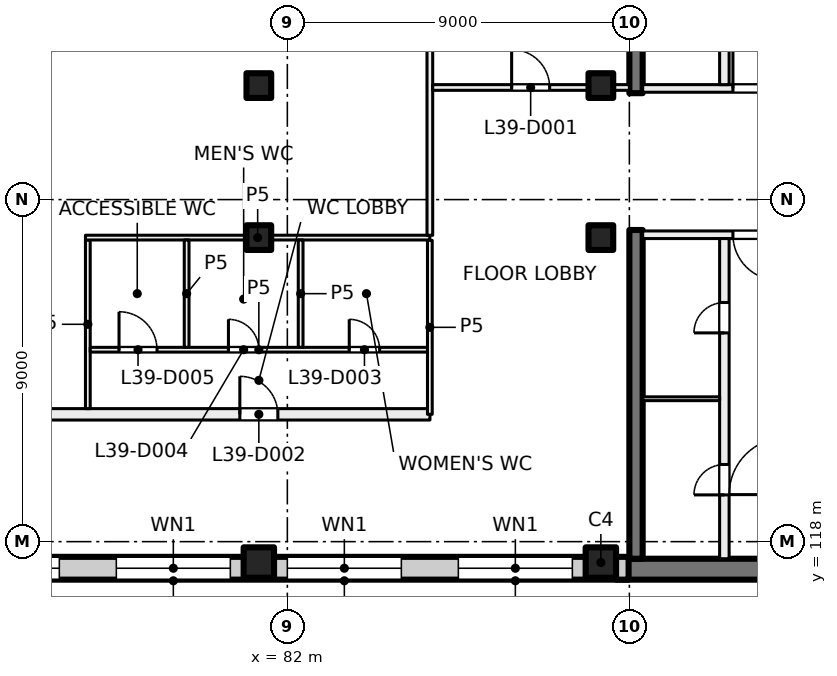
"""IFC4 building model, lengths in metres.
Left out: names, types, materials, properties, quantities, classifications, styles, units other than length and angle.
Written with IfcOpenShell. Run it as: python <this file> out.ifc"""

import sys

from ifc_helpers import new_model, si_unit, direction, frame, frame_2d, origin, origin_2d, place, context, subcontext, project, spatial, rectangle, extrude, element, fill, save


model = new_model("IFC4")
c1 = context("Model", 3, precision=1e-05, world=origin(), true_north=direction((0.0, 1.0)))
c2 = subcontext(c1, "Body", "Model", "MODEL_VIEW")
j1 = project(units=[si_unit("LENGTHUNIT", "METRE"), si_unit("PLANEANGLEUNIT", "RADIAN")], contexts=[c1])
p1 = place(None, origin())
s1 = spatial("IfcSite", under=j1, at=p1, CompositionType="ELEMENT")
p2 = place(p1, origin())
s2 = spatial("IfcBuilding", under=s1, at=p2, CompositionType="ELEMENT")
p3 = place(p2, frame((0.0, 0.0, 166.5)))
s3 = spatial("IfcBuildingStorey", under=s2, at=p3, CompositionType="ELEMENT", Elevation=166.5)
for number, where, z_axis, x_axis in (
    (1, (81.25, 130.0, 0.0), (0.0, 0.0, 1.0), (1.0, 0.0, 0.0)),
    (2, (90.25, 130.0, 0.0), (0.0, 0.0, 1.0), (1.0, 0.0, 0.0)),
    (3, (81.25, 126.0, 0.0), (0.0, 0.0, 1.0), (1.0, 0.0, 0.0)),
    (4, (90.25, 126.0, 0.0), (0.0, 0.0, 1.0), (1.0, 0.0, 0.0)),
):
    element("IfcColumn", number, at=place(p3, frame(where, z_axis=z_axis, x_axis=x_axis)), inside=s3, PredefinedType="COLUMN", context=c2, shape_type="SweptSolid", body=[
        extrude(rectangle(XDim=0.65, YDim=0.65, at=origin_2d()), origin(), (0.0, 0.0, 1.0), 4.0),
    ])
for number, where, z_axis, x_axis in (
    (5, (81.25, 117.45, 0.0), (0.0, 0.0, 1.0), (1.0, 0.0, 0.0)),
    (6, (90.25, 117.45, 0.0), (0.0, 0.0, 1.0), (1.0, 0.0, 0.0)),
):
    element("IfcColumn", number, at=place(p3, frame(where, z_axis=z_axis, x_axis=x_axis)), inside=s3, PredefinedType="COLUMN", context=c2, shape_type="SweptSolid", body=[
        extrude(rectangle(XDim=0.8, YDim=0.8, at=origin_2d()), origin(), (0.0, 0.0, 1.0), 4.0),
    ])
p4 = place(p3, frame((99.6, 117.275, 0.0), z_axis=(0.0, 0.0, 1.0), x_axis=(-1.0, 0.0, 0.0)))
e7 = element("IfcWall", 7, at=p4, inside=s3, PredefinedType="SHEAR", context=c2, shape_type="SweptSolid", body=[
    extrude(rectangle(XDim=8.95, YDim=0.55, at=frame_2d((4.475, 0.0))), origin(), (0.0, 0.0, 1.0), 4.0),
])
for number, where, z_axis, x_axis in (
    (8, (91.175, 138.45, 0.0), (0.0, 0.0, 1.0), (0.0, -1.0, 0.0)),
    (9, (91.175, 126.2, 0.0), (0.0, 0.0, 1.0), (0.0, -1.0, 0.0)),
):
    element("IfcWall", number, at=place(p3, frame(where, z_axis=z_axis, x_axis=x_axis)), inside=s3, PredefinedType="SHEAR", context=c2, shape_type="SweptSolid", body=[
        extrude(rectangle(XDim=8.65, YDim=0.35, at=frame_2d((4.325, 0.0))), origin(), (0.0, 0.0, 1.0), 4.0),
    ])
p5 = place(p3, frame((90.98, 117.3, 0.0), z_axis=(0.0, 0.0, 1.0), x_axis=(-1.0, 0.0, 0.0)))
e10 = element("IfcWall", 10, at=p5, inside=s3, PredefinedType="SOLIDWALL", context=c2, shape_type="SweptSolid", body=[
    extrude(rectangle(XDim=33.745, YDim=0.6, at=frame_2d((16.873, 0.0))), origin(), (0.0, 0.0, 1.0), 3.625),
])
p6 = place(p5, frame((1.48, 0.0, 0.9)))
e11 = element("IfcOpeningElement", 11, at=p6, cuts=e10, PredefinedType="OPENING", context=c2, shape_type="SweptSolid", body=[
    extrude(rectangle(XDim=3.0, YDim=2.4, at=frame_2d((1.5, 1.2))), frame((0.0, 0.31, 0.0), z_axis=(0.0, -1.0, 0.0), x_axis=(1.0, 0.0, 0.0)), (0.0, 0.0, 1.0), 0.62),
])
p7 = place(p5, frame((5.98, 0.0, 0.9)))
e12 = element("IfcOpeningElement", 12, at=p7, cuts=e10, PredefinedType="OPENING", context=c2, shape_type="SweptSolid", body=[
    extrude(rectangle(XDim=3.0, YDim=2.4, at=frame_2d((1.5, 1.2))), frame((0.0, 0.31, 0.0), z_axis=(0.0, -1.0, 0.0), x_axis=(1.0, 0.0, 0.0)), (0.0, 0.0, 1.0), 0.62),
])
p8 = place(p5, frame((10.48, 0.0, 0.9)))
e13 = element("IfcOpeningElement", 13, at=p8, cuts=e10, PredefinedType="OPENING", context=c2, shape_type="SweptSolid", body=[
    extrude(rectangle(XDim=3.0, YDim=2.4, at=frame_2d((1.5, 1.2))), frame((0.0, 0.31, 0.0), z_axis=(0.0, -1.0, 0.0), x_axis=(1.0, 0.0, 0.0)), (0.0, 0.0, 1.0), 0.62),
])
p9 = place(p5, frame((14.98, 0.0, 0.9)))
e14 = element("IfcOpeningElement", 14, at=p9, cuts=e10, PredefinedType="OPENING", context=c2, shape_type="SweptSolid", body=[
    extrude(rectangle(XDim=3.0, YDim=2.4, at=frame_2d((1.5, 1.2))), frame((0.0, 0.31, 0.0), z_axis=(0.0, -1.0, 0.0), x_axis=(1.0, 0.0, 0.0)), (0.0, 0.0, 1.0), 0.62),
])
p10 = place(p5, frame((20.08, 0.0, 0.0)))
e15 = element("IfcOpeningElement", 15, at=p10, cuts=e10, PredefinedType="OPENING", context=c2, shape_type="SweptSolid", body=[
    extrude(rectangle(XDim=1.8, YDim=2.4, at=frame_2d((0.9, 1.2))), frame((0.0, 0.31, 0.0), z_axis=(0.0, -1.0, 0.0), x_axis=(1.0, 0.0, 0.0)), (0.0, 0.0, 1.0), 0.62),
])
p11 = place(p5, frame((23.98, 0.0, 0.9)))
e16 = element("IfcOpeningElement", 16, at=p11, cuts=e10, PredefinedType="OPENING", context=c2, shape_type="SweptSolid", body=[
    extrude(rectangle(XDim=3.0, YDim=2.4, at=frame_2d((1.5, 1.2))), frame((0.0, 0.31, 0.0), z_axis=(0.0, -1.0, 0.0), x_axis=(1.0, 0.0, 0.0)), (0.0, 0.0, 1.0), 0.62),
])
p12 = place(p5, frame((28.48, 0.0, 0.9)))
e17 = element("IfcOpeningElement", 17, at=p12, cuts=e10, PredefinedType="OPENING", context=c2, shape_type="SweptSolid", body=[
    extrude(rectangle(XDim=3.0, YDim=2.4, at=frame_2d((1.5, 1.2))), frame((0.0, 0.31, 0.0), z_axis=(0.0, -1.0, 0.0), x_axis=(1.0, 0.0, 0.0)), (0.0, 0.0, 1.0), 0.62),
])
p13 = place(p3, frame((95.225, 126.075, 0.0), z_axis=(0.0, 0.0, 1.0), x_axis=(-1.0, 0.0, 0.0)))
e18 = element("IfcWall", 18, at=p13, inside=s3, PredefinedType="PARTITIONING", context=c2, shape_type="SweptSolid", body=[
    extrude(rectangle(XDim=3.875, YDim=0.2, at=frame_2d((1.938, 0.0))), origin(), (0.0, 0.0, 1.0), 3.625),
])
p14 = place(p13, frame((0.3, 0.0, 0.0)))
e19 = element("IfcOpeningElement", 19, at=p14, cuts=e18, PredefinedType="OPENING", context=c2, shape_type="SweptSolid", body=[
    extrude(rectangle(XDim=1.2, YDim=2.1, at=frame_2d((0.6, 1.05))), frame((0.0, 0.11, 0.0), z_axis=(0.0, -1.0, 0.0), x_axis=(1.0, 0.0, 0.0)), (0.0, 0.0, 1.0), 0.22),
])
p15 = place(p3, frame((93.5, 117.55, 0.0), z_axis=(0.0, 0.0, 1.0), x_axis=(0.0, 1.0, 0.0)))
e20 = element("IfcWall", 20, at=p15, inside=s3, PredefinedType="PARTITIONING", context=c2, shape_type="SweptSolid", body=[
    extrude(rectangle(XDim=8.425, YDim=0.25, at=frame_2d((4.212, 0.0))), origin(), (0.0, 0.0, 1.0), 3.625),
])
p16 = place(p15, frame((5.942, 0.0, 0.0)))
e21 = element("IfcOpeningElement", 21, at=p16, cuts=e20, PredefinedType="OPENING", context=c2, shape_type="SweptSolid", body=[
    extrude(rectangle(XDim=0.8, YDim=2.1, at=frame_2d((0.4, 1.05))), frame((0.0, 0.135, 0.0), z_axis=(0.0, -1.0, 0.0), x_axis=(1.0, 0.0, 0.0)), (0.0, 0.0, 1.0), 0.27),
])
p17 = place(p15, frame((1.68, 0.0, 0.0)))
e22 = element("IfcOpeningElement", 22, at=p17, cuts=e20, PredefinedType="OPENING", context=c2, shape_type="SweptSolid", body=[
    extrude(rectangle(XDim=0.8, YDim=2.1, at=frame_2d((0.4, 1.05))), frame((0.0, 0.135, 0.0), z_axis=(0.0, -1.0, 0.0), x_axis=(1.0, 0.0, 0.0)), (0.0, 0.0, 1.0), 0.27),
])
p18 = place(p3, frame((93.375, 121.76, 0.0), z_axis=(0.0, 0.0, 1.0), x_axis=(-1.0, 0.0, 0.0)))
e23 = element("IfcWall", 23, at=p18, inside=s3, PredefinedType="PARTITIONING", context=c2, shape_type="SweptSolid", body=[
    extrude(rectangle(XDim=2.025, YDim=0.1, at=frame_2d((1.012, 0.0))), origin(), (0.0, 0.0, 1.0), 3.625),
])
p19 = place(p3, frame((91.35, 129.925, 0.0), z_axis=(0.0, 0.0, 1.0), x_axis=(1.0, 0.0, 0.0)))
e24 = element("IfcWall", 24, at=p19, inside=s3, PredefinedType="PARTITIONING", context=c2, shape_type="SweptSolid", body=[
    extrude(rectangle(XDim=3.875, YDim=0.2, at=frame_2d((1.938, 0.0))), origin(), (0.0, 0.0, 1.0), 3.625),
])
p20 = place(p19, frame((2.375, 0.0, 0.0)))
e25 = element("IfcOpeningElement", 25, at=p20, cuts=e24, PredefinedType="OPENING", context=c2, shape_type="SweptSolid", body=[
    extrude(rectangle(XDim=1.2, YDim=2.1, at=frame_2d((0.6, 1.05))), frame((0.0, 0.11, 0.0), z_axis=(0.0, -1.0, 0.0), x_axis=(1.0, 0.0, 0.0)), (0.0, 0.0, 1.0), 0.22),
])
p21 = place(p3, frame((93.5, 130.025, 0.0), z_axis=(0.0, 0.0, 1.0), x_axis=(0.0, 1.0, 0.0)))
e26 = element("IfcWall", 26, at=p21, inside=s3, PredefinedType="PARTITIONING", context=c2, shape_type="SweptSolid", body=[
    extrude(rectangle(XDim=8.425, YDim=0.25, at=frame_2d((4.212, 0.0))), origin(), (0.0, 0.0, 1.0), 3.625),
])
p22 = place(p21, frame((3.812, 0.0, 0.0)))
e27 = element("IfcOpeningElement", 27, at=p22, cuts=e26, PredefinedType="OPENING", context=c2, shape_type="SweptSolid", body=[
    extrude(rectangle(XDim=0.8, YDim=2.1, at=frame_2d((0.4, 1.05))), frame((0.0, 0.135, 0.0), z_axis=(0.0, -1.0, 0.0), x_axis=(1.0, 0.0, 0.0)), (0.0, 0.0, 1.0), 0.27),
])
p23 = place(p3, frame((50.657, 121.35, 0.0), z_axis=(0.0, 0.0, 1.0), x_axis=(1.0, 0.0, 0.0)))
e28 = element("IfcWall", 28, at=p23, inside=s3, PredefinedType="PARTITIONING", context=c2, shape_type="SweptSolid", body=[
    extrude(rectangle(XDim=35.096, YDim=0.3, at=frame_2d((17.548, 0.0))), origin(), (0.0, 0.0, 1.0), 3.625),
])
p24 = place(p23, frame((30.093, 0.0, 0.0)))
e29 = element("IfcOpeningElement", 29, at=p24, cuts=e28, PredefinedType="OPENING", context=c2, shape_type="SweptSolid", body=[
    extrude(rectangle(XDim=1.0, YDim=2.1, at=frame_2d((0.5, 1.05))), frame((0.0, 0.16, 0.0), z_axis=(0.0, -1.0, 0.0), x_axis=(1.0, 0.0, 0.0)), (0.0, 0.0, 1.0), 0.32),
])
p25 = place(p23, frame((13.943, 0.0, 0.0)))
e30 = element("IfcOpeningElement", 30, at=p25, cuts=e28, PredefinedType="OPENING", context=c2, shape_type="SweptSolid", body=[
    extrude(rectangle(XDim=1.8, YDim=2.1, at=frame_2d((0.9, 1.05))), frame((0.0, 0.16, 0.0), z_axis=(0.0, -1.0, 0.0), x_axis=(1.0, 0.0, 0.0)), (0.0, 0.0, 1.0), 0.32),
])
p26 = place(p23, frame((0.896, 0.0, 0.0)))
e31 = element("IfcOpeningElement", 31, at=p26, cuts=e28, PredefinedType="OPENING", context=c2, shape_type="SweptSolid", body=[
    extrude(rectangle(XDim=1.8, YDim=2.1, at=frame_2d((0.9, 1.05))), frame((0.0, 0.16, 0.0), z_axis=(0.0, -1.0, 0.0), x_axis=(1.0, 0.0, 0.0)), (0.0, 0.0, 1.0), 0.32),
])
p27 = place(p3, frame((76.75, 121.5, 0.0), z_axis=(0.0, 0.0, 1.0), x_axis=(0.0, 1.0, 0.0)))
e32 = element("IfcWall", 32, at=p27, inside=s3, PredefinedType="PARTITIONING", context=c2, shape_type="SweptSolid", body=[
    extrude(rectangle(XDim=4.438, YDim=0.125, at=frame_2d((2.219, 0.0))), origin(), (0.0, 0.0, 1.0), 3.625),
])
p28 = place(p3, frame((76.812, 123.05, 0.0), z_axis=(0.0, 0.0, 1.0), x_axis=(1.0, 0.0, 0.0)))
e33 = element("IfcWall", 33, at=p28, inside=s3, PredefinedType="PARTITIONING", context=c2, shape_type="SweptSolid", body=[
    extrude(rectangle(XDim=8.876, YDim=0.125, at=frame_2d((4.438, 0.0))), origin(), (0.0, 0.0, 1.0), 3.625),
])
p29 = place(p28, frame((6.817, 0.0, 0.0)))
e34 = element("IfcOpeningElement", 34, at=p29, cuts=e33, PredefinedType="OPENING", context=c2, shape_type="SweptSolid", body=[
    extrude(rectangle(XDim=0.8, YDim=2.1, at=frame_2d((0.4, 1.05))), frame((0.0, 0.073, 0.0), z_axis=(0.0, -1.0, 0.0), x_axis=(1.0, 0.0, 0.0)), (0.0, 0.0, 1.0), 0.145),
])
p30 = place(p28, frame((3.638, 0.0, 0.0)))
e35 = element("IfcOpeningElement", 35, at=p30, cuts=e33, PredefinedType="OPENING", context=c2, shape_type="SweptSolid", body=[
    extrude(rectangle(XDim=0.8, YDim=2.1, at=frame_2d((0.4, 1.05))), frame((0.0, 0.073, 0.0), z_axis=(0.0, -1.0, 0.0), x_axis=(1.0, 0.0, 0.0)), (0.0, 0.0, 1.0), 0.145),
])
p31 = place(p28, frame((0.759, 0.0, 0.0)))
e36 = element("IfcOpeningElement", 36, at=p31, cuts=e33, PredefinedType="OPENING", context=c2, shape_type="SweptSolid", body=[
    extrude(rectangle(XDim=1.0, YDim=2.1, at=frame_2d((0.5, 1.05))), frame((0.0, 0.073, 0.0), z_axis=(0.0, -1.0, 0.0), x_axis=(1.0, 0.0, 0.0)), (0.0, 0.0, 1.0), 0.145),
])
p32 = place(p3, frame((76.688, 126.0, 0.0), z_axis=(0.0, 0.0, 1.0), x_axis=(1.0, 0.0, 0.0)))
e37 = element("IfcWall", 37, at=p32, inside=s3, PredefinedType="PARTITIONING", context=c2, shape_type="SweptSolid", body=[
    extrude(rectangle(XDim=9.062, YDim=0.125, at=frame_2d((4.531, 0.0))), origin(), (0.0, 0.0, 1.0), 3.625),
])
for number, where, z_axis, x_axis in (
    (38, (79.35, 125.938, 0.0), (0.0, 0.0, 1.0), (0.0, -1.0, 0.0)),
    (39, (82.35, 125.938, 0.0), (0.0, 0.0, 1.0), (0.0, -1.0, 0.0)),
):
    element("IfcWall", number, at=place(p3, frame(where, z_axis=z_axis, x_axis=x_axis)), inside=s3, PredefinedType="PARTITIONING", context=c2, shape_type="SweptSolid", body=[
        extrude(rectangle(XDim=2.826, YDim=0.125, at=frame_2d((1.413, 0.0))), origin(), (0.0, 0.0, 1.0), 3.625),
    ])
p33 = place(p3, frame((85.75, 121.35, 0.0), z_axis=(0.0, 0.0, 1.0), x_axis=(0.0, 1.0, 0.0)))
e40 = element("IfcWall", 40, at=p33, inside=s3, PredefinedType="PARTITIONING", context=c2, shape_type="SweptSolid", body=[
    extrude(rectangle(XDim=4.578, YDim=0.125, at=frame_2d((2.289, 0.0))), origin(), (0.0, 0.0, 1.0), 3.625),
])
p34 = place(p3, frame((85.75, 126.06, 0.0), z_axis=(0.0, 0.0, 1.0), x_axis=(0.0, 1.0, 0.0)))
e41 = element("IfcWall", 41, at=p34, inside=s3, PredefinedType="PARTITIONING", context=c2, shape_type="SweptSolid", body=[
    extrude(rectangle(XDim=12.34, YDim=0.15, at=frame_2d((6.17, 0.0))), origin(), (0.0, 0.0, 1.0), 3.625),
])
p35 = place(p3, frame((85.825, 129.95, 0.0), z_axis=(0.0, 0.0, 1.0), x_axis=(1.0, 0.0, 0.0)))
e42 = element("IfcWall", 42, at=p35, inside=s3, PredefinedType="PARTITIONING", context=c2, shape_type="SweptSolid", body=[
    extrude(rectangle(XDim=5.175, YDim=0.15, at=frame_2d((2.587, 0.0))), origin(), (0.0, 0.0, 1.0), 3.625),
])
p36 = place(p35, frame((2.077, 0.0, 0.0)))
e43 = element("IfcOpeningElement", 43, at=p36, cuts=e42, PredefinedType="OPENING", context=c2, shape_type="SweptSolid", body=[
    extrude(rectangle(XDim=1.0, YDim=2.1, at=frame_2d((0.5, 1.05))), frame((0.0, 0.085, 0.0), z_axis=(0.0, -1.0, 0.0), x_axis=(1.0, 0.0, 0.0)), (0.0, 0.0, 1.0), 0.17),
])
p37 = place(p6, origin())
e44 = element("IfcWindow", 44, at=p37, inside=s3, PartitioningType="SINGLE_PANEL", PredefinedType="WINDOW", context=c2, shape_type="SweptSolid", body=[
    extrude(rectangle(XDim=3.0, YDim=2.4, at=frame_2d((1.5, 1.2))), frame((0.0, 0.03, 0.0), z_axis=(0.0, -1.0, 0.0), x_axis=(1.0, 0.0, 0.0)), (0.0, 0.0, 1.0), 0.06),
])
fill(e11, e44)
p38 = place(p7, origin())
e45 = element("IfcWindow", 45, at=p38, inside=s3, PartitioningType="SINGLE_PANEL", PredefinedType="WINDOW", context=c2, shape_type="SweptSolid", body=[
    extrude(rectangle(XDim=3.0, YDim=2.4, at=frame_2d((1.5, 1.2))), frame((0.0, 0.03, 0.0), z_axis=(0.0, -1.0, 0.0), x_axis=(1.0, 0.0, 0.0)), (0.0, 0.0, 1.0), 0.06),
])
fill(e12, e45)
p39 = place(p8, origin())
e46 = element("IfcWindow", 46, at=p39, inside=s3, PartitioningType="SINGLE_PANEL", PredefinedType="WINDOW", context=c2, shape_type="SweptSolid", body=[
    extrude(rectangle(XDim=3.0, YDim=2.4, at=frame_2d((1.5, 1.2))), frame((0.0, 0.03, 0.0), z_axis=(0.0, -1.0, 0.0), x_axis=(1.0, 0.0, 0.0)), (0.0, 0.0, 1.0), 0.06),
])
fill(e13, e46)
p40 = place(p9, origin())
e47 = element("IfcWindow", 47, at=p40, inside=s3, PartitioningType="SINGLE_PANEL", PredefinedType="WINDOW", context=c2, shape_type="SweptSolid", body=[
    extrude(rectangle(XDim=3.0, YDim=2.4, at=frame_2d((1.5, 1.2))), frame((0.0, 0.03, 0.0), z_axis=(0.0, -1.0, 0.0), x_axis=(1.0, 0.0, 0.0)), (0.0, 0.0, 1.0), 0.06),
])
fill(e14, e47)
p41 = place(p14, origin())
e48 = element("IfcDoor", 48, at=p41, inside=s3, OperationType="DOUBLE_DOOR_SINGLE_SWING", PredefinedType="DOOR", context=c2, shape_type="SweptSolid", body=[
    extrude(rectangle(XDim=1.2, YDim=2.1, at=frame_2d((0.6, 1.05))), frame((0.0, 0.025, 0.0), z_axis=(0.0, -1.0, 0.0), x_axis=(1.0, 0.0, 0.0)), (0.0, 0.0, 1.0), 0.05),
])
fill(e19, e48)
p42 = place(p16, origin())
e49 = element("IfcDoor", 49, at=p42, inside=s3, OperationType="SINGLE_SWING_LEFT", PredefinedType="DOOR", context=c2, shape_type="SweptSolid", body=[
    extrude(rectangle(XDim=0.8, YDim=2.1, at=frame_2d((0.4, 1.05))), frame((0.0, 0.025, 0.0), z_axis=(0.0, -1.0, 0.0), x_axis=(1.0, 0.0, 0.0)), (0.0, 0.0, 1.0), 0.05),
])
fill(e21, e49)
p43 = place(p17, origin())
e50 = element("IfcDoor", 50, at=p43, inside=s3, OperationType="SINGLE_SWING_RIGHT", PredefinedType="DOOR", context=c2, shape_type="SweptSolid", body=[
    extrude(rectangle(XDim=0.8, YDim=2.1, at=frame_2d((0.4, 1.05))), frame((0.0, 0.025, 0.0), z_axis=(0.0, -1.0, 0.0), x_axis=(1.0, 0.0, 0.0)), (0.0, 0.0, 1.0), 0.05),
])
fill(e22, e50)
p44 = place(p20, origin())
e51 = element("IfcDoor", 51, at=p44, inside=s3, OperationType="DOUBLE_DOOR_SINGLE_SWING", PredefinedType="DOOR", context=c2, shape_type="SweptSolid", body=[
    extrude(rectangle(XDim=1.2, YDim=2.1, at=frame_2d((0.6, 1.05))), frame((0.0, 0.025, 0.0), z_axis=(0.0, -1.0, 0.0), x_axis=(1.0, 0.0, 0.0)), (0.0, 0.0, 1.0), 0.05),
])
fill(e25, e51)
p45 = place(p36, origin())
e52 = element("IfcDoor", 52, at=p45, inside=s3, OperationType="SINGLE_SWING_LEFT", PredefinedType="DOOR", context=c2, shape_type="SweptSolid", body=[
    extrude(rectangle(XDim=1.0, YDim=2.1, at=frame_2d((0.5, 1.05))), frame((0.0, 0.025, 0.0), z_axis=(0.0, -1.0, 0.0), x_axis=(1.0, 0.0, 0.0)), (0.0, 0.0, 1.0), 0.05),
])
fill(e43, e52)
p46 = place(p24, origin())
e53 = element("IfcDoor", 53, at=p46, inside=s3, OperationType="SINGLE_SWING_LEFT", PredefinedType="DOOR", context=c2, shape_type="SweptSolid", body=[
    extrude(rectangle(XDim=1.0, YDim=2.1, at=frame_2d((0.5, 1.05))), frame((0.0, 0.025, 0.0), z_axis=(0.0, -1.0, 0.0), x_axis=(1.0, 0.0, 0.0)), (0.0, 0.0, 1.0), 0.05),
])
fill(e29, e53)
p47 = place(p29, origin())
e54 = element("IfcDoor", 54, at=p47, inside=s3, OperationType="SINGLE_SWING_RIGHT", PredefinedType="DOOR", context=c2, shape_type="SweptSolid", body=[
    extrude(rectangle(XDim=0.8, YDim=2.1, at=frame_2d((0.4, 1.05))), frame((0.0, 0.025, 0.0), z_axis=(0.0, -1.0, 0.0), x_axis=(1.0, 0.0, 0.0)), (0.0, 0.0, 1.0), 0.05),
])
fill(e34, e54)
p48 = place(p30, origin())
e55 = element("IfcDoor", 55, at=p48, inside=s3, OperationType="SINGLE_SWING_LEFT", PredefinedType="DOOR", context=c2, shape_type="SweptSolid", body=[
    extrude(rectangle(XDim=0.8, YDim=2.1, at=frame_2d((0.4, 1.05))), frame((0.0, 0.025, 0.0), z_axis=(0.0, -1.0, 0.0), x_axis=(1.0, 0.0, 0.0)), (0.0, 0.0, 1.0), 0.05),
])
fill(e35, e55)
p49 = place(p31, origin())
e56 = element("IfcDoor", 56, at=p49, inside=s3, OperationType="SINGLE_SWING_LEFT", PredefinedType="DOOR", context=c2, shape_type="SweptSolid", body=[
    extrude(rectangle(XDim=1.0, YDim=2.1, at=frame_2d((0.5, 1.05))), frame((0.0, 0.025, 0.0), z_axis=(0.0, -1.0, 0.0), x_axis=(1.0, 0.0, 0.0)), (0.0, 0.0, 1.0), 0.05),
])
fill(e36, e56)
save(model, sys.argv[1])
